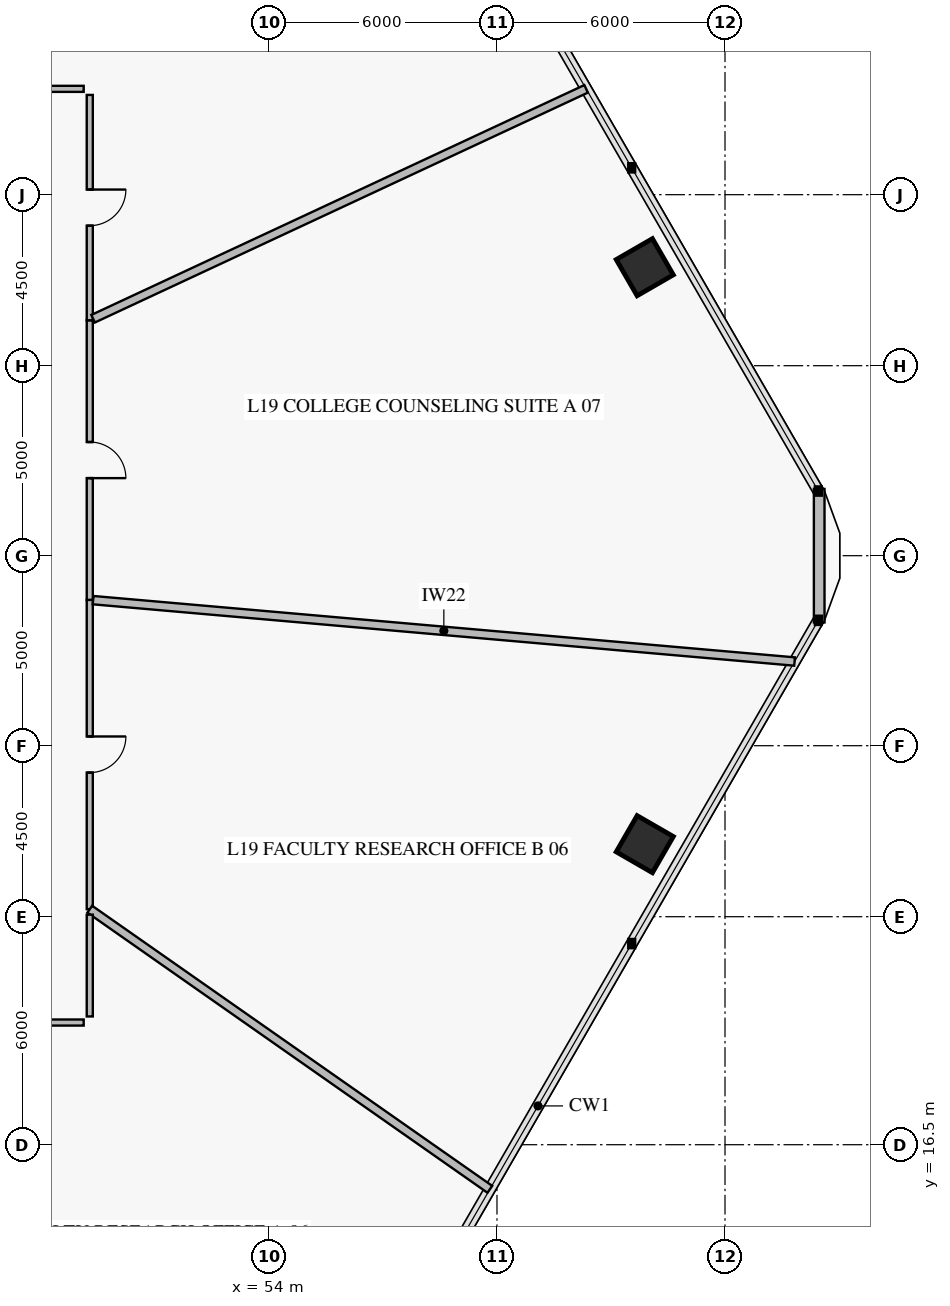
"""IFC4 building model, lengths in metres.
Left out: names, types, materials, properties, quantities, classifications, styles, units other than length and angle.
Written with IfcOpenShell. Run it as: python <this file> out.ifc"""

import sys

from ifc_helpers import new_model, si_unit, direction, frame, frame_2d, origin, origin_2d, place, context, subcontext, project, spatial, rectangle, extrude, element, fill, save


model = new_model("IFC4")
c1 = context("Model", 3, precision=1e-05, world=origin(), true_north=direction((0.0, 1.0)))
c2 = subcontext(c1, "Body", "Model", "MODEL_VIEW")
j1 = project(units=[si_unit("LENGTHUNIT", "METRE"), si_unit("PLANEANGLEUNIT", "RADIAN")], contexts=[c1])
p1 = place(None, origin())
s1 = spatial("IfcSite", under=j1, at=p1, CompositionType="ELEMENT")
p2 = place(p1, origin())
s2 = spatial("IfcBuilding", under=s1, at=p2, CompositionType="ELEMENT")
p3 = place(p2, frame((0.0, 0.0, 79.2)))
s3 = spatial("IfcBuildingStorey", under=s2, at=p3, CompositionType="ELEMENT", Elevation=79.2)
for number, where, z_axis, x_axis in (
    (1, (63.889, 39.592, 0.0), (0.0, 0.0, 1.0), (-0.5, 0.866, 0.0)),
    (2, (63.889, 24.408, 0.0), (0.0, 0.0, 1.0), (0.5, 0.866, 0.0)),
):
    element("IfcColumn", number, at=place(p3, frame(where, z_axis=z_axis, x_axis=x_axis)), inside=s3, PredefinedType="COLUMN", context=c2, shape_type="SweptSolid", body=[
        extrude(rectangle(XDim=1.1, YDim=1.1, at=origin_2d()), origin(), (0.0, 0.0, 1.0), 3.92),
    ])
p4 = place(p3, frame((68.479, 33.758, 0.0), z_axis=(0.0, 0.0, 1.0), x_axis=(0.0, -1.0, 0.0)))
e3 = element("IfcWall", 3, at=p4, inside=s3, PredefinedType="SOLIDWALL", context=c2, shape_type="SweptSolid", body=[
    extrude(rectangle(XDim=3.515, YDim=0.28, at=frame_2d((1.758, 0.0))), origin(), (0.0, 0.0, 1.0), 3.92),
])
p5 = place(p3, frame((41.729, 19.715, 0.0), z_axis=(0.0, 0.0, 1.0), x_axis=(1.0, 0.0, 0.0)))
e4 = element("IfcWall", 4, at=p5, inside=s3, PredefinedType="PARTITIONING", context=c2, shape_type="SweptSolid", body=[
    extrude(rectangle(XDim=7.396, YDim=0.16, at=frame_2d((3.698, 0.0))), origin(), (0.0, 0.0, 1.0), 3.22),
])
p6 = place(p5, frame((3.223, 0.0, 0.0)))
e5 = element("IfcOpeningElement", 5, at=p6, cuts=e4, PredefinedType="OPENING", context=c2, shape_type="SweptSolid", body=[
    extrude(rectangle(XDim=0.95, YDim=2.1, at=frame_2d((0.475, 1.05))), frame((0.0, 0.092, 0.0), z_axis=(0.0, -1.0, 0.0), x_axis=(1.0, 0.0, 0.0)), (0.0, 0.0, 1.0), 0.184),
])
p7 = place(p3, frame((49.285, 22.698, 0.0), z_axis=(0.0, 0.0, 1.0), x_axis=(0.0, 1.0, 0.0)))
e6 = element("IfcWall", 6, at=p7, inside=s3, PredefinedType="PARTITIONING", context=c2, shape_type="SweptSolid", body=[
    extrude(rectangle(XDim=8.14, YDim=0.16, at=frame_2d((4.07, 0.0))), origin(), (0.0, 0.0, 1.0), 3.22),
])
p8 = place(p7, frame((3.595, 0.0, 0.0)))
e7 = element("IfcOpeningElement", 7, at=p8, cuts=e6, PredefinedType="OPENING", context=c2, shape_type="SweptSolid", body=[
    extrude(rectangle(XDim=0.95, YDim=2.1, at=frame_2d((0.475, 1.05))), frame((0.0, 0.092, 0.0), z_axis=(0.0, -1.0, 0.0), x_axis=(1.0, 0.0, 0.0)), (0.0, 0.0, 1.0), 0.184),
])
p9 = place(p3, frame((49.285, 30.838, 0.0), z_axis=(0.0, 0.0, 1.0), x_axis=(0.0, 1.0, 0.0)))
e8 = element("IfcWall", 8, at=p9, inside=s3, PredefinedType="PARTITIONING", context=c2, shape_type="SweptSolid", body=[
    extrude(rectangle(XDim=7.357, YDim=0.16, at=frame_2d((3.679, 0.0))), origin(), (0.0, 0.0, 1.0), 3.22),
])
p10 = place(p9, frame((3.204, 0.0, 0.0)))
e9 = element("IfcOpeningElement", 9, at=p10, cuts=e8, PredefinedType="OPENING", context=c2, shape_type="SweptSolid", body=[
    extrude(rectangle(XDim=0.95, YDim=2.1, at=frame_2d((0.475, 1.05))), frame((0.0, 0.092, 0.0), z_axis=(0.0, -1.0, 0.0), x_axis=(1.0, 0.0, 0.0)), (0.0, 0.0, 1.0), 0.184),
])
p11 = place(p3, frame((49.285, 38.195, 0.0), z_axis=(0.0, 0.0, 1.0), x_axis=(0.0, 1.0, 0.0)))
e10 = element("IfcWall", 10, at=p11, inside=s3, PredefinedType="PARTITIONING", context=c2, shape_type="SweptSolid", body=[
    extrude(rectangle(XDim=5.93, YDim=0.16, at=frame_2d((2.965, 0.0))), origin(), (0.0, 0.0, 1.0), 3.92),
])
p12 = place(p11, frame((2.49, 0.0, 0.0)))
e11 = element("IfcOpeningElement", 11, at=p12, cuts=e10, PredefinedType="OPENING", context=c2, shape_type="SweptSolid", body=[
    extrude(rectangle(XDim=0.95, YDim=2.1, at=frame_2d((0.475, 1.05))), frame((0.0, 0.092, 0.0), z_axis=(0.0, -1.0, 0.0), x_axis=(1.0, 0.0, 0.0)), (0.0, 0.0, 1.0), 0.184),
])
p13 = place(p3, frame((44.602, 44.285, 0.0), z_axis=(0.0, 0.0, 1.0), x_axis=(0.573572509316, 0.819154794014, 0.0)))
e12 = element("IfcWall", 12, at=p13, inside=s3, PredefinedType="PARTITIONING", context=c2, shape_type="SweptSolid", body=[
    extrude(rectangle(XDim=16.955, YDim=0.22, at=frame_2d((8.478, 0.0))), origin(), (0.0, 0.0, 1.0), 3.17),
])
p14 = place(p3, frame((42.196, 44.373, 0.0), z_axis=(0.0, 0.0, 1.0), x_axis=(0.447750531228, 0.89415852162, 0.0)))
e13 = element("IfcWall", 13, at=p14, inside=s3, PredefinedType="PARTITIONING", context=c2, shape_type="SweptSolid", body=[
    extrude(rectangle(XDim=18.549, YDim=0.12, at=frame_2d((9.274, 0.0))), origin(), (0.0, 0.0, 1.0), 3.17),
])
p15 = place(p3, frame((41.77, 19.627, 0.0), z_axis=(0.0, 0.0, 1.0), x_axis=(0.422616678834, -0.906308525156, 0.0)))
e14 = element("IfcWall", 14, at=p15, inside=s3, PredefinedType="PARTITIONING", context=c2, shape_type="SweptSolid", body=[
    extrude(rectangle(XDim=18.3, YDim=0.22, at=frame_2d((9.15, 0.0))), origin(), (0.0, 0.0, 1.0), 3.17),
])
p16 = place(p3, frame((49.285, 22.698, 0.0), z_axis=(0.0, 0.0, 1.0), x_axis=(0.819154265409, -0.57357326425, 0.0)))
e15 = element("IfcWall", 15, at=p16, inside=s3, PredefinedType="PARTITIONING", context=c2, shape_type="SweptSolid", body=[
    extrude(rectangle(XDim=12.851, YDim=0.22, at=frame_2d((6.426, 0.0))), origin(), (0.0, 0.0, 1.0), 3.17),
])
p17 = place(p3, frame((49.285, 19.875, 0.0), z_axis=(0.0, 0.0, 1.0), x_axis=(0.0, 1.0, 0.0)))
e16 = element("IfcWall", 16, at=p17, inside=s3, PredefinedType="PARTITIONING", context=c2, shape_type="SweptSolid", body=[
    extrude(rectangle(XDim=2.679, YDim=0.16, at=frame_2d((1.339, 0.0))), origin(), (0.0, 0.0, 1.0), 3.92),
])
p18 = place(p3, frame((49.373, 30.83, 0.0), z_axis=(0.0, 0.0, 1.0), x_axis=(0.99619391773, -0.087164661858, 0.0)))
e17 = element("IfcWall", 17, at=p18, inside=s3, PredefinedType="PARTITIONING", context=c2, shape_type="SweptSolid", body=[
    extrude(rectangle(XDim=18.528, YDim=0.22, at=frame_2d((9.264, 0.0))), origin(), (0.0, 0.0, 1.0), 3.17),
])
p19 = place(p3, frame((49.373, 38.236, 0.0), z_axis=(0.0, 0.0, 1.0), x_axis=(0.906309468756, 0.422614655263, 0.0)))
e18 = element("IfcWall", 18, at=p19, inside=s3, PredefinedType="PARTITIONING", context=c2, shape_type="SweptSolid", body=[
    extrude(rectangle(XDim=14.313, YDim=0.22, at=frame_2d((7.157, 0.0))), origin(), (0.0, 0.0, 1.0), 3.17),
])
p20 = place(p3, frame((49.125, 44.285, 0.0), z_axis=(0.0, 0.0, 1.0), x_axis=(-1.0, 0.0, 0.0)))
e19 = element("IfcWall", 19, at=p20, inside=s3, PredefinedType="PARTITIONING", context=c2, shape_type="SweptSolid", body=[
    extrude(rectangle(XDim=4.379, YDim=0.16, at=frame_2d((2.189, 0.0))), origin(), (0.0, 0.0, 1.0), 3.22),
])
p21 = place(p8, frame((0.95, 0.0, 0.0), z_axis=(0.0, 0.0, 1.0), x_axis=(-1.0, 0.0, 0.0)))
e20 = element("IfcDoor", 20, at=p21, inside=s3, OperationType="SINGLE_SWING_LEFT", PredefinedType="DOOR", context=c2, shape_type="SweptSolid", body=[
    extrude(rectangle(XDim=0.95, YDim=2.1, at=frame_2d((0.475, 1.05))), frame((0.0, 0.025, 0.0), z_axis=(0.0, -1.0, 0.0), x_axis=(1.0, 0.0, 0.0)), (0.0, 0.0, 1.0), 0.05),
])
fill(e7, e20)
p22 = place(p10, frame((0.95, 0.0, 0.0), z_axis=(0.0, 0.0, 1.0), x_axis=(-1.0, 0.0, 0.0)))
e21 = element("IfcDoor", 21, at=p22, inside=s3, OperationType="SINGLE_SWING_RIGHT", PredefinedType="DOOR", context=c2, shape_type="SweptSolid", body=[
    extrude(rectangle(XDim=0.95, YDim=2.1, at=frame_2d((0.475, 1.05))), frame((0.0, 0.025, 0.0), z_axis=(0.0, -1.0, 0.0), x_axis=(1.0, 0.0, 0.0)), (0.0, 0.0, 1.0), 0.05),
])
fill(e9, e21)
p23 = place(p12, frame((0.95, 0.0, 0.0), z_axis=(0.0, 0.0, 1.0), x_axis=(-1.0, 0.0, 0.0)))
e22 = element("IfcDoor", 22, at=p23, inside=s3, OperationType="SINGLE_SWING_LEFT", PredefinedType="DOOR", context=c2, shape_type="SweptSolid", body=[
    extrude(rectangle(XDim=0.95, YDim=2.1, at=frame_2d((0.475, 1.05))), frame((0.0, 0.025, 0.0), z_axis=(0.0, -1.0, 0.0), x_axis=(1.0, 0.0, 0.0)), (0.0, 0.0, 1.0), 0.05),
])
fill(e11, e22)
save(model, sys.argv[1])
